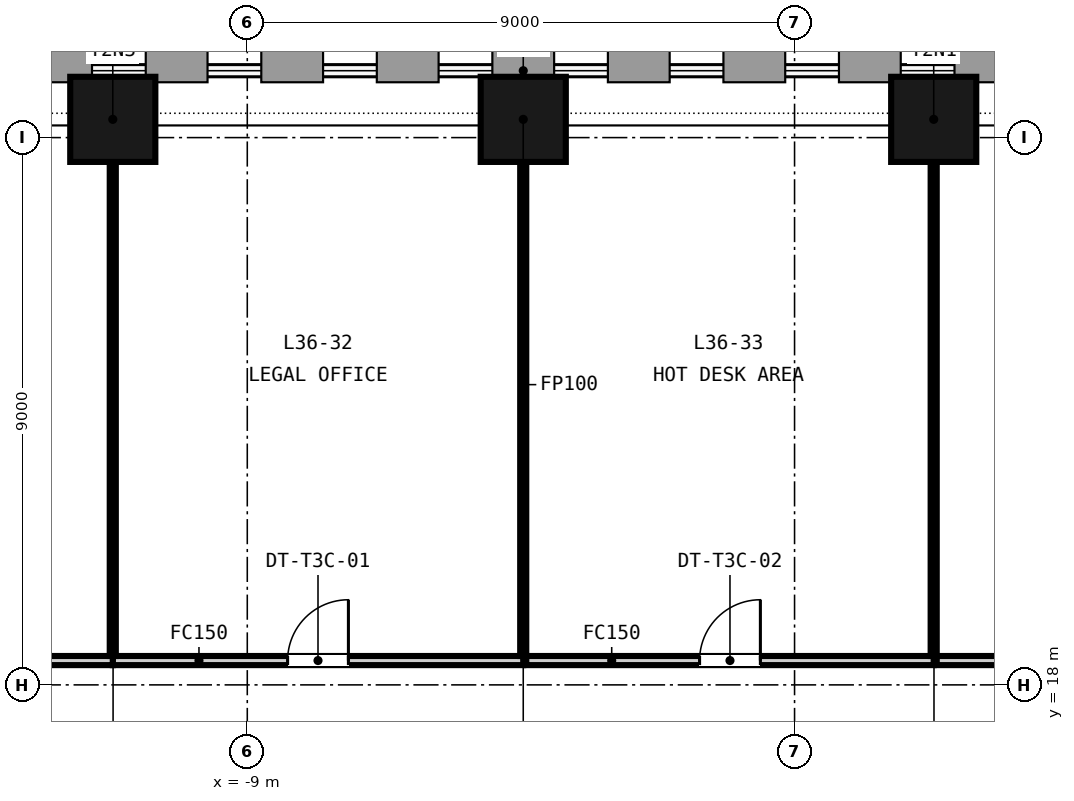
"""IFC4 building model, lengths in metres.
Left out: names, types, materials, properties, quantities, classifications, styles, units other than length and angle.
Written with IfcOpenShell. Run it as: python <this file> out.ifc"""

import sys

from ifc_helpers import new_model, si_unit, direction, frame, frame_2d, origin, origin_2d, place, context, subcontext, project, spatial, rectangle, extrude, element, fill, save


model = new_model("IFC4")
c1 = context("Model", 3, precision=1e-05, world=origin(), true_north=direction((0.0, 1.0)))
c2 = subcontext(c1, "Body", "Model", "MODEL_VIEW")
j1 = project(units=[si_unit("LENGTHUNIT", "METRE"), si_unit("PLANEANGLEUNIT", "RADIAN")], contexts=[c1])
p1 = place(None, origin())
s1 = spatial("IfcSite", under=j1, at=p1, CompositionType="ELEMENT")
p2 = place(p1, origin())
s2 = spatial("IfcBuilding", under=s1, at=p2, CompositionType="ELEMENT")
p3 = place(p2, frame((0.0, 0.0, 148.05)))
s3 = spatial("IfcBuildingStorey", under=s2, at=p3, CompositionType="ELEMENT", Elevation=148.05)
for number, where, z_axis, x_axis in (
    (1, (2.288, 27.3, -0.15), (0.0, 0.0, 1.0), (-1.0, 0.0, 0.0)),
    (2, (-4.462, 27.3, -0.15), (0.0, 0.0, 1.0), (-1.0, 0.0, 0.0)),
    (3, (-11.212, 27.3, -0.15), (0.0, 0.0, 1.0), (-1.0, 0.0, 0.0)),
):
    element("IfcColumn", number, at=place(p3, frame(where, z_axis=z_axis, x_axis=x_axis)), inside=s3, PredefinedType="COLUMN", context=c2, shape_type="SweptSolid", body=[
        extrude(rectangle(XDim=1.4, YDim=1.4, at=origin_2d()), origin(), (0.0, 0.0, 1.0), 3.65),
    ])
p4 = place(p3, frame((-11.212, 18.4, 0.0), z_axis=(0.0, 0.0, 1.0), x_axis=(1.0, 0.0, 0.0)))
e4 = element("IfcWall", 4, at=p4, inside=s3, PredefinedType="PARTITIONING", context=c2, shape_type="SweptSolid", body=[
    extrude(rectangle(XDim=6.75, YDim=0.15, at=frame_2d((3.375, 0.0))), origin(), (0.0, 0.0, 1.0), 2.741),
])
p5 = place(p4, frame((2.875, 0.0, 0.0)))
e5 = element("IfcOpeningElement", 5, at=p5, cuts=e4, PredefinedType="OPENING", context=c2, shape_type="SweptSolid", body=[
    extrude(rectangle(XDim=1.0, YDim=2.1, at=frame_2d((0.5, 1.05))), frame((0.0, 0.085, 0.0), z_axis=(0.0, -1.0, 0.0), x_axis=(1.0, 0.0, 0.0)), (0.0, 0.0, 1.0), 0.17),
])
p6 = place(p3, frame((-4.462, 18.475, 0.0), z_axis=(0.0, 0.0, 1.0), x_axis=(0.0, 1.0, 0.0)))
e6 = element("IfcWall", 6, at=p6, inside=s3, PredefinedType="PARTITIONING", context=c2, shape_type="SweptSolid", body=[
    extrude(rectangle(XDim=8.925, YDim=0.1, at=frame_2d((4.462, 0.0))), origin(), (0.0, 0.0, 1.0), 2.741),
])
p7 = place(p3, frame((-4.412, 18.4, 0.0), z_axis=(0.0, 0.0, 1.0), x_axis=(1.0, 0.0, 0.0)))
e7 = element("IfcWall", 7, at=p7, inside=s3, PredefinedType="PARTITIONING", context=c2, shape_type="SweptSolid", body=[
    extrude(rectangle(XDim=6.7, YDim=0.15, at=frame_2d((3.35, 0.0))), origin(), (0.0, 0.0, 1.0), 2.741),
])
p8 = place(p7, frame((2.85, 0.0, 0.0)))
e8 = element("IfcOpeningElement", 8, at=p8, cuts=e7, PredefinedType="OPENING", context=c2, shape_type="SweptSolid", body=[
    extrude(rectangle(XDim=1.0, YDim=2.1, at=frame_2d((0.5, 1.05))), frame((0.0, 0.085, 0.0), z_axis=(0.0, -1.0, 0.0), x_axis=(1.0, 0.0, 0.0)), (0.0, 0.0, 1.0), 0.17),
])
p9 = place(p3, frame((2.288, 18.475, 0.0), z_axis=(0.0, 0.0, 1.0), x_axis=(0.0, 1.0, 0.0)))
e9 = element("IfcWall", 9, at=p9, inside=s3, PredefinedType="PARTITIONING", context=c2, shape_type="SweptSolid", body=[
    extrude(rectangle(XDim=8.925, YDim=0.1, at=frame_2d((4.462, 0.0))), origin(), (0.0, 0.0, 1.0), 2.741),
])
p10 = place(p3, frame((-19.915, 18.4, 0.0), z_axis=(0.0, 0.0, 1.0), x_axis=(1.0, 0.0, 0.0)))
e10 = element("IfcWall", 10, at=p10, inside=s3, PredefinedType="PARTITIONING", context=c2, shape_type="SweptSolid", body=[
    extrude(rectangle(XDim=8.703, YDim=0.15, at=frame_2d((4.352, 0.0))), origin(), (0.0, 0.0, 1.0), 2.741),
])
p11 = place(p10, frame((3.852, 0.0, 0.0)))
e11 = element("IfcOpeningElement", 11, at=p11, cuts=e10, PredefinedType="OPENING", context=c2, shape_type="SweptSolid", body=[
    extrude(rectangle(XDim=1.0, YDim=2.1, at=frame_2d((0.5, 1.05))), frame((0.0, 0.085, 0.0), z_axis=(0.0, -1.0, 0.0), x_axis=(1.0, 0.0, 0.0)), (0.0, 0.0, 1.0), 0.17),
])
p12 = place(p3, frame((-11.212, 18.475, 0.0), z_axis=(0.0, 0.0, 1.0), x_axis=(0.0, 1.0, 0.0)))
e12 = element("IfcWall", 12, at=p12, inside=s3, PredefinedType="PARTITIONING", context=c2, shape_type="SweptSolid", body=[
    extrude(rectangle(XDim=8.925, YDim=0.1, at=frame_2d((4.462, 0.0))), origin(), (0.0, 0.0, 1.0), 2.741),
])
p13 = place(p3, frame((2.338, 18.4, 0.0), z_axis=(0.0, 0.0, 1.0), x_axis=(1.0, 0.0, 0.0)))
e13 = element("IfcWall", 13, at=p13, inside=s3, PredefinedType="PARTITIONING", context=c2, shape_type="SweptSolid", body=[
    extrude(rectangle(XDim=12.587, YDim=0.15, at=frame_2d((6.293, 0.0))), origin(), (0.0, 0.0, 1.0), 2.741),
])
p14 = place(p13, frame((5.394, 0.0, 0.0)))
e14 = element("IfcOpeningElement", 14, at=p14, cuts=e13, PredefinedType="OPENING", context=c2, shape_type="SweptSolid", body=[
    extrude(rectangle(XDim=1.8, YDim=2.1, at=frame_2d((0.9, 1.05))), frame((0.0, 0.085, 0.0), z_axis=(0.0, -1.0, 0.0), x_axis=(1.0, 0.0, 0.0)), (0.0, 0.0, 1.0), 0.17),
])
p15 = place(p5, origin())
e15 = element("IfcDoor", 15, at=p15, inside=s3, OperationType="SINGLE_SWING_RIGHT", PredefinedType="DOOR", context=c2, shape_type="SweptSolid", body=[
    extrude(rectangle(XDim=1.0, YDim=2.1, at=frame_2d((0.5, 1.05))), frame((0.0, 0.025, 0.0), z_axis=(0.0, -1.0, 0.0), x_axis=(1.0, 0.0, 0.0)), (0.0, 0.0, 1.0), 0.05),
])
fill(e5, e15)
p16 = place(p8, origin())
e16 = element("IfcDoor", 16, at=p16, inside=s3, OperationType="SINGLE_SWING_RIGHT", PredefinedType="DOOR", context=c2, shape_type="SweptSolid", body=[
    extrude(rectangle(XDim=1.0, YDim=2.1, at=frame_2d((0.5, 1.05))), frame((0.0, 0.025, 0.0), z_axis=(0.0, -1.0, 0.0), x_axis=(1.0, 0.0, 0.0)), (0.0, 0.0, 1.0), 0.05),
])
fill(e8, e16)
save(model, sys.argv[1])
